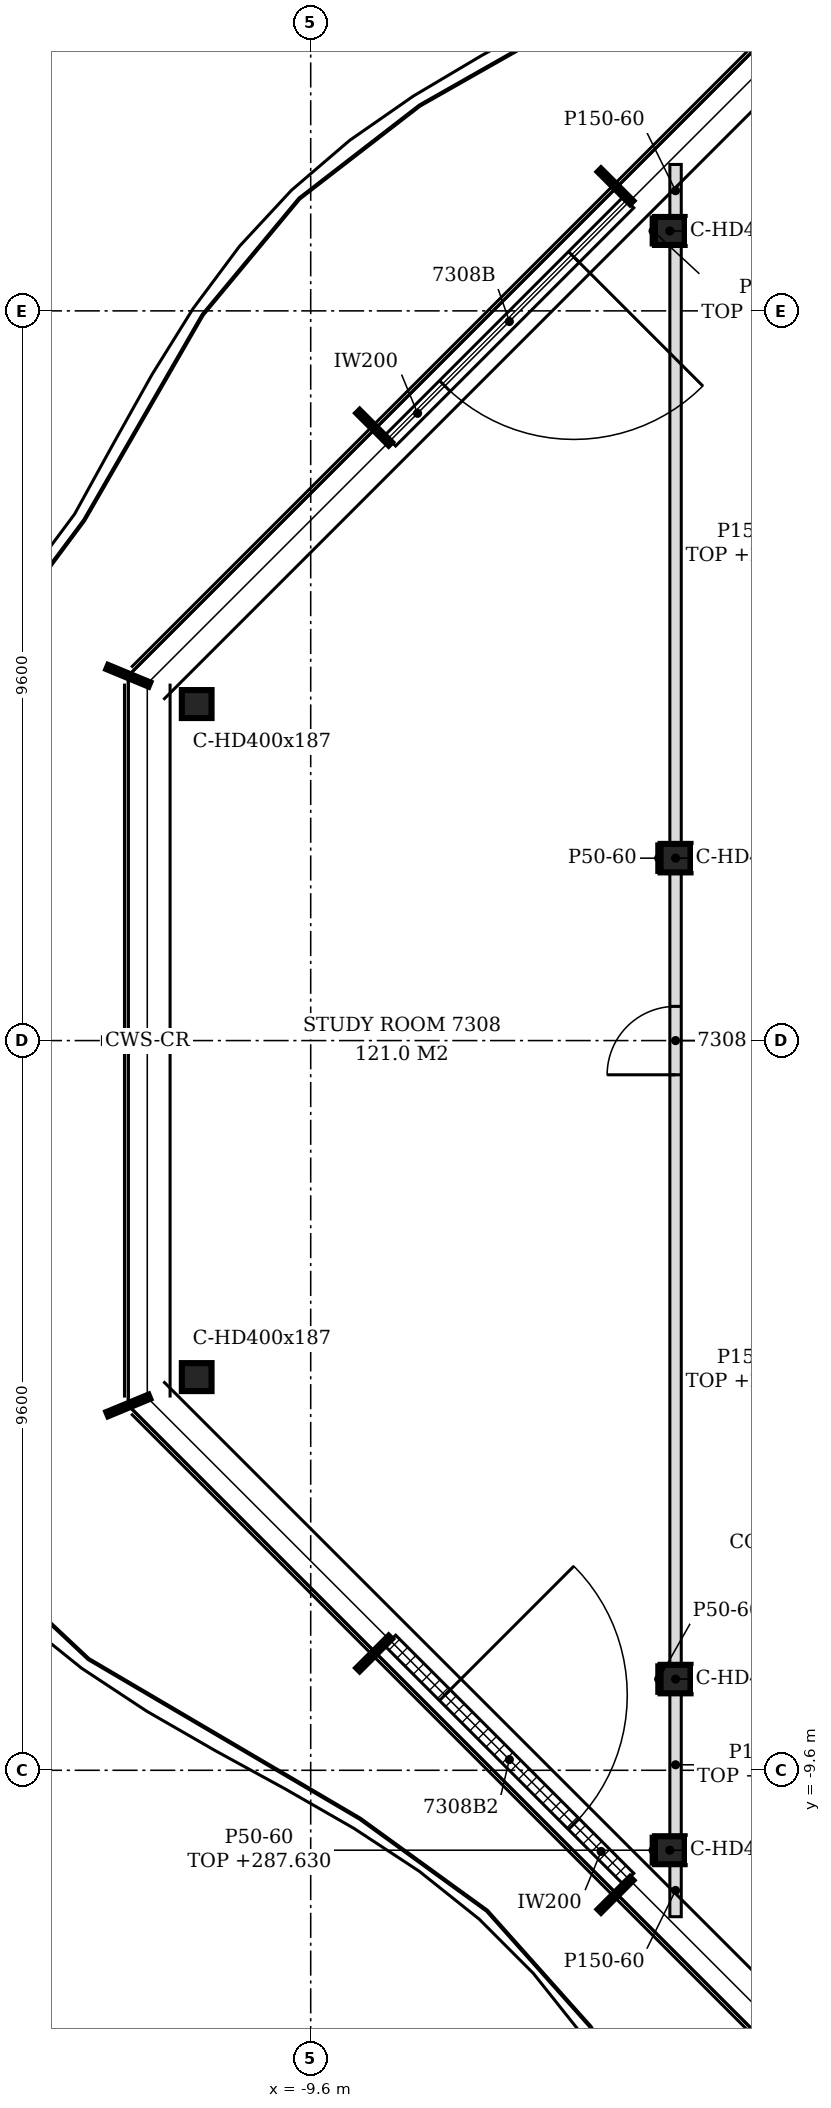
"""IFC4 building model, lengths in metres.
Left out: names, types, materials, properties, quantities, classifications, styles, units other than length and angle.
Written with IfcOpenShell. Run it as: python <this file> out.ifc"""

import sys

from ifc_helpers import new_model, si_unit, direction, frame, frame_2d, origin, origin_2d, place, context, subcontext, project, spatial, polyline, rectangle, i_section, outline, extrude, element, fill, save


model = new_model("IFC4")
c1 = context("Model", 3, precision=1e-05, world=origin(), true_north=direction((0.0, 1.0)))
c2 = subcontext(c1, "Body", "Model", "MODEL_VIEW")
j1 = project(units=[si_unit("LENGTHUNIT", "METRE"), si_unit("PLANEANGLEUNIT", "RADIAN")], contexts=[c1])
p1 = place(None, origin())
s1 = spatial("IfcSite", under=j1, at=p1, CompositionType="ELEMENT")
p2 = place(p1, origin())
s2 = spatial("IfcBuilding", under=s1, at=p2, CompositionType="ELEMENT")
p3 = place(p2, frame((0.0, 0.0, 285.0)))
s3 = spatial("IfcBuildingStorey", under=s2, at=p3, CompositionType="ELEMENT", Elevation=285.0)
for number, where, z_axis, x_axis in (
    (1, (-4.876, 10.652, -0.15), (0.0, 0.0, 1.0), (1.0, 0.0, 0.0)),
    (2, (-11.1, 4.427, -0.15), (0.0, 0.0, 1.0), (1.0, 0.0, 0.0)),
    (3, (-11.1, -4.427, -0.15), (0.0, 0.0, 1.0), (1.0, 0.0, 0.0)),
    (4, (-4.876, -10.652, -0.15), (0.0, 0.0, 1.0), (1.0, 0.0, 0.0)),
):
    element("IfcColumn", number, at=place(p3, frame(where, z_axis=z_axis, x_axis=x_axis)), inside=s3, PredefinedType="COLUMN", context=c2, shape_type="SweptSolid", body=[
        extrude(i_section(OverallWidth=0.391, OverallDepth=0.368, WebThickness=0.015, FlangeThickness=0.024, FilletRadius=0.015, at=origin_2d()), origin(), (0.0, 0.0, 1.0), 3.6),
    ])
for number, where, z_axis, x_axis in (
    (5, (-4.8, -8.4, -0.15), (0.0, 0.0, 1.0), (1.0, 0.0, 0.0)),
    (6, (-4.8, 2.4, -0.15), (0.0, 0.0, 1.0), (1.0, 0.0, 0.0)),
):
    element("IfcColumn", number, at=place(p3, frame(where, z_axis=z_axis, x_axis=x_axis)), inside=s3, PredefinedType="COLUMN", context=c2, shape_type="SweptSolid", body=[
        extrude(i_section(OverallWidth=0.394, OverallDepth=0.375, WebThickness=0.017, FlangeThickness=0.028, FilletRadius=0.015, at=origin_2d()), origin(), (0.0, 0.0, 1.0), 3.6),
    ])
p4 = place(p3, frame((-5.42, 11.026, 0.0), z_axis=(0.0, 0.0, 1.0), x_axis=(-0.707134329907, -0.707079231393, 0.0)))
e7 = element("IfcWall", 7, at=p4, inside=s3, PredefinedType="NOTDEFINED", context=c2, shape_type="SweptSolid", body=[
    extrude(rectangle(XDim=4.431, YDim=0.2, at=frame_2d((2.215, 0.0))), origin(), (0.0, 0.0, 1.0), 3.45),
])
p5 = place(p4, frame((1.015, 0.0, 0.0)))
e8 = element("IfcOpeningElement", 8, at=p5, cuts=e7, PredefinedType="OPENING", context=c2, shape_type="SweptSolid", body=[
    extrude(rectangle(XDim=2.4, YDim=2.4, at=frame_2d((1.2, 1.2))), frame((0.0, 0.11, 0.0), z_axis=(0.0, -1.0, 0.0), x_axis=(1.0, 0.0, 0.0)), (0.0, 0.0, 1.0), 0.22),
])
p6 = place(p3, frame((-8.553, -7.893, 0.0), z_axis=(0.0, 0.0, 1.0), x_axis=(0.707134329907, -0.707079231393, 0.0)))
e9 = element("IfcWall", 9, at=p6, inside=s3, PredefinedType="NOTDEFINED", context=c2, shape_type="SweptSolid", body=[
    extrude(rectangle(XDim=4.431, YDim=0.2, at=frame_2d((2.215, 0.0))), origin(), (0.0, 0.0, 1.0), 3.45),
])
p7 = place(p6, frame((1.015, 0.0, 0.0)))
e10 = element("IfcOpeningElement", 10, at=p7, cuts=e9, PredefinedType="OPENING", context=c2, shape_type="SweptSolid", body=[
    extrude(rectangle(XDim=2.4, YDim=2.4, at=frame_2d((1.2, 1.2))), frame((0.0, 0.11, 0.0), z_axis=(0.0, -1.0, 0.0), x_axis=(1.0, 0.0, 0.0)), (0.0, 0.0, 1.0), 0.22),
])
p8 = place(p3, frame((-4.8, -11.526, 0.0), z_axis=(0.0, 0.0, 1.0), x_axis=(0.0, 1.0, 0.0)))
e11 = element("IfcWall", 11, at=p8, inside=s3, PredefinedType="PARTITIONING", context=c2, shape_type="SweptSolid", body=[
    extrude(outline(polyline([(0.0, 0.0), (0.691, 0.0), (0.691, 2.63), (0.229, 2.63), (0.227, 3.45), (0.0, 3.45), (0.0, 0.0)])), frame((0.0, 0.075, 0.0), z_axis=(0.0, -1.0, 0.0), x_axis=(1.0, 0.0, 0.0)), (0.0, 0.0, 1.0), 0.15),
])
p9 = place(p3, frame((-4.8, -10.468, 0.0), z_axis=(0.0, 0.0, 1.0), x_axis=(0.0, 1.0, 0.0)))
e12 = element("IfcWall", 12, at=p9, inside=s3, PredefinedType="PARTITIONING", context=c2, shape_type="SweptSolid", body=[
    extrude(outline(polyline([(0.0, 0.0), (1.88, 0.0), (1.88, 3.03), (0.31, 3.03), (0.308, 2.63), (0.066, 2.63), (0.064, 3.03), (0.0, 3.03), (0.0, 0.0)])), frame((0.0, 0.075, 0.0), z_axis=(0.0, -1.0, 0.0), x_axis=(1.0, 0.0, 0.0)), (0.0, 0.0, 1.0), 0.15),
])
p10 = place(p3, frame((-4.8, -8.212, 0.0), z_axis=(0.0, 0.0, 1.0), x_axis=(0.0, 1.0, 0.0)))
e13 = element("IfcWall", 13, at=p10, inside=s3, PredefinedType="PARTITIONING", context=c2, shape_type="SweptSolid", body=[
    extrude(rectangle(XDim=10.425, YDim=0.15, at=frame_2d((5.212, 0.0))), origin(), (0.0, 0.0, 1.0), 2.83),
])
p11 = place(p10, frame((7.762, 0.0, 0.0)))
e14 = element("IfcOpeningElement", 14, at=p11, cuts=e13, PredefinedType="OPENING", context=c2, shape_type="SweptSolid", body=[
    extrude(rectangle(XDim=0.9, YDim=2.1, at=frame_2d((0.45, 1.05))), frame((0.0, 0.085, 0.0), z_axis=(0.0, -1.0, 0.0), x_axis=(1.0, 0.0, 0.0)), (0.0, 0.0, 1.0), 0.17),
])
p12 = place(p3, frame((-4.8, 2.587, 0.0), z_axis=(0.0, 0.0, 1.0), x_axis=(0.0, 1.0, 0.0)))
e15 = element("IfcWall", 15, at=p12, inside=s3, PredefinedType="PARTITIONING", context=c2, shape_type="SweptSolid", body=[
    extrude(outline(polyline([(0.0, 0.0), (7.88, 0.0), (7.88, 2.93), (7.814, 2.93), (7.812, 2.63), (7.57, 2.63), (7.568, 2.93), (0.0, 2.93), (0.0, 0.0)])), frame((0.0, 0.075, 0.0), z_axis=(0.0, -1.0, 0.0), x_axis=(1.0, 0.0, 0.0)), (0.0, 0.0, 1.0), 0.15),
])
p13 = place(p3, frame((-4.8, 10.835, 0.0), z_axis=(0.0, 0.0, 1.0), x_axis=(0.0, 1.0, 0.0)))
e16 = element("IfcWall", 16, at=p13, inside=s3, PredefinedType="PARTITIONING", context=c2, shape_type="SweptSolid", body=[
    extrude(outline(polyline([(0.0, 0.0), (0.691, 0.0), (0.691, 3.45), (0.462, 3.45), (0.46, 2.63), (0.0, 2.63), (0.0, 0.0)])), frame((0.0, 0.075, 0.0), z_axis=(0.0, -1.0, 0.0), x_axis=(1.0, 0.0, 0.0)), (0.0, 0.0, 1.0), 0.15),
])
p14 = place(p3, frame((-5.096, -10.835, 0.0), z_axis=(0.0, 0.0, 1.0), x_axis=(0.0, 1.0, 0.0)))
e17 = element("IfcWall", 17, at=p14, inside=s3, PredefinedType="PARTITIONING", context=c2, shape_type="SweptSolid", body=[
    extrude(rectangle(XDim=0.368, YDim=0.05, at=frame_2d((0.184, 0.0))), origin(), (0.0, 0.0, 1.0), 2.63),
])
for number, where, z_axis, x_axis in (
    (18, (-5.022, -8.587, 0.0), (0.0, 0.0, 1.0), (0.0, 1.0, 0.0)),
    (19, (-5.022, 2.212, 0.0), (0.0, 0.0, 1.0), (0.0, 1.0, 0.0)),
):
    element("IfcWall", number, at=place(p3, frame(where, z_axis=z_axis, x_axis=x_axis)), inside=s3, PredefinedType="PARTITIONING", context=c2, shape_type="SweptSolid", body=[
        extrude(rectangle(XDim=0.375, YDim=0.05, at=frame_2d((0.188, 0.0))), origin(), (0.0, 0.0, 1.0), 3.45),
    ])
p15 = place(p3, frame((-5.096, 10.468, 0.0), z_axis=(0.0, 0.0, 1.0), x_axis=(0.0, 1.0, 0.0)))
e20 = element("IfcWall", 20, at=p15, inside=s3, PredefinedType="PARTITIONING", context=c2, shape_type="SweptSolid", body=[
    extrude(rectangle(XDim=0.368, YDim=0.05, at=frame_2d((0.184, 0.0))), origin(), (0.0, 0.0, 1.0), 2.63),
])
p16 = place(p5, origin())
e21 = element("IfcDoor", 21, at=p16, inside=s3, OperationType="SINGLE_SWING_LEFT", PredefinedType="DOOR", context=c2, shape_type="SweptSolid", body=[
    extrude(rectangle(XDim=2.4, YDim=2.4, at=frame_2d((1.2, 1.2))), frame((0.0, 0.025, 0.0), z_axis=(0.0, -1.0, 0.0), x_axis=(1.0, 0.0, 0.0)), (0.0, 0.0, 1.0), 0.05),
])
fill(e8, e21)
p17 = place(p7, origin())
e22 = element("IfcDoor", 22, at=p17, inside=s3, OperationType="SINGLE_SWING_LEFT", PredefinedType="DOOR", context=c2, shape_type="SweptSolid", body=[
    extrude(rectangle(XDim=2.4, YDim=2.4, at=frame_2d((1.2, 1.2))), frame((0.0, 0.025, 0.0), z_axis=(0.0, -1.0, 0.0), x_axis=(1.0, 0.0, 0.0)), (0.0, 0.0, 1.0), 0.05),
])
fill(e10, e22)
p18 = place(p11, origin())
e23 = element("IfcDoor", 23, at=p18, inside=s3, OperationType="SINGLE_SWING_LEFT", PredefinedType="DOOR", context=c2, shape_type="SweptSolid", body=[
    extrude(rectangle(XDim=0.9, YDim=2.1, at=frame_2d((0.45, 1.05))), frame((0.0, 0.025, 0.0), z_axis=(0.0, -1.0, 0.0), x_axis=(1.0, 0.0, 0.0)), (0.0, 0.0, 1.0), 0.05),
])
fill(e14, e23)
save(model, sys.argv[1])
